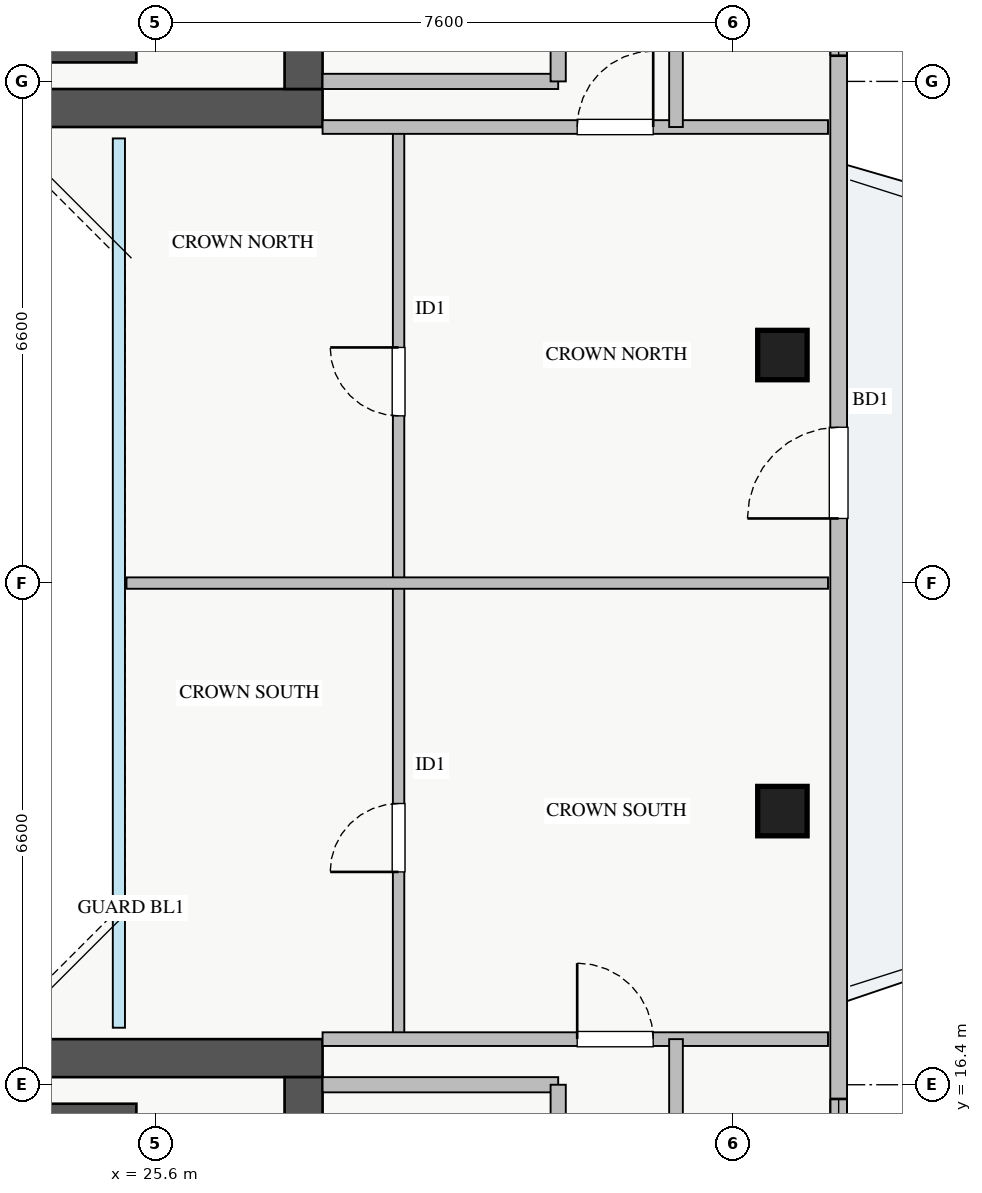
"""IFC4 building model, lengths in metres.
Left out: names, types, materials, properties, quantities, classifications, styles, units other than length and angle.
Written with IfcOpenShell. Run it as: python <this file> out.ifc"""

import sys

from ifc_helpers import new_model, si_unit, direction, frame, frame_2d, origin, origin_2d, place, context, subcontext, project, spatial, rectangle, extrude, source, transform, mapped, element, fill, save


model = new_model("IFC4")
c1 = context("Model", 3, precision=1e-05, world=origin(), true_north=direction((0.0, 1.0)))
c2 = subcontext(c1, "Body", "Model", "MODEL_VIEW")
j1 = project(units=[si_unit("LENGTHUNIT", "METRE"), si_unit("PLANEANGLEUNIT", "RADIAN")], contexts=[c1])
p1 = place(None, origin())
s1 = spatial("IfcSite", under=j1, at=p1, CompositionType="ELEMENT")
p2 = place(p1, origin())
s2 = spatial("IfcBuilding", under=s1, at=p2, CompositionType="ELEMENT")
p3 = place(p2, frame((0.0, 0.0, 243.75)))
s3 = spatial("IfcBuildingStorey", under=s2, at=p3, CompositionType="ELEMENT", Elevation=243.75)
for number, where, z_axis, x_axis in (
    (1, (18.2, 29.95, 0.0), (0.0, 0.0, 1.0), (1.0, 0.0, 0.0)),
    (2, (18.2, 16.05, 0.0), (0.0, 0.0, 1.0), (1.0, 0.0, 0.0)),
):
    element("IfcWall", number, at=place(p3, frame(where, z_axis=z_axis, x_axis=x_axis)), inside=s3, PredefinedType="SHEAR", context=c2, shape_type="SweptSolid", body=[
        extrude(rectangle(XDim=7.15, YDim=0.2, at=frame_2d((3.575, 0.0))), origin(), (0.0, 0.0, 1.0), 3.25),
    ])
p4 = place(p3, frame((10.2, 29.25, 0.0), z_axis=(0.0, 0.0, 1.0), x_axis=(1.0, 0.0, 0.0)))
e3 = element("IfcWall", 3, at=p4, inside=s3, PredefinedType="SHEAR", context=c2, shape_type="SweptSolid", body=[
    extrude(rectangle(XDim=17.6, YDim=0.5, at=frame_2d((8.8, 0.0))), origin(), (0.0, 0.0, 1.0), 3.25),
])
p5 = place(p3, frame((27.55, 29.5, 0.0), z_axis=(0.0, 0.0, 1.0), x_axis=(0.0, 1.0, 0.0)))
e4 = element("IfcWall", 4, at=p5, inside=s3, PredefinedType="SHEAR", context=c2, shape_type="SweptSolid", body=[
    extrude(rectangle(XDim=6.2, YDim=0.5, at=frame_2d((3.1, 0.0))), origin(), (0.0, 0.0, 1.0), 3.25),
])
p6 = place(p5, frame((1.1, 0.0, 0.0)))
e5 = element("IfcOpeningElement", 5, at=p6, cuts=e4, PredefinedType="OPENING", context=c2, shape_type="SweptSolid", body=[
    extrude(rectangle(XDim=1.3, YDim=2.05, at=frame_2d((0.65, 1.025))), frame((0.0, 0.26, 0.0), z_axis=(0.0, -1.0, 0.0), x_axis=(1.0, 0.0, 0.0)), (0.0, 0.0, 1.0), 0.52),
])
p7 = place(p3, frame((10.2, 16.75, 0.0), z_axis=(0.0, 0.0, 1.0), x_axis=(1.0, 0.0, 0.0)))
e6 = element("IfcWall", 6, at=p7, inside=s3, PredefinedType="SHEAR", context=c2, shape_type="SweptSolid", body=[
    extrude(rectangle(XDim=17.6, YDim=0.5, at=frame_2d((8.8, 0.0))), origin(), (0.0, 0.0, 1.0), 3.25),
])
p8 = place(p3, frame((27.55, 10.3, 0.0), z_axis=(0.0, 0.0, 1.0), x_axis=(0.0, 1.0, 0.0)))
e7 = element("IfcWall", 7, at=p8, inside=s3, PredefinedType="SHEAR", context=c2, shape_type="SweptSolid", body=[
    extrude(rectangle(XDim=6.2, YDim=0.5, at=frame_2d((3.1, 0.0))), origin(), (0.0, 0.0, 1.0), 3.25),
])
p9 = place(p8, frame((2.1, 0.0, 0.0)))
e8 = element("IfcOpeningElement", 8, at=p9, cuts=e7, PredefinedType="OPENING", context=c2, shape_type="SweptSolid", body=[
    extrude(rectangle(XDim=1.3, YDim=2.05, at=frame_2d((0.65, 1.025))), frame((0.0, 0.26, 0.0), z_axis=(0.0, -1.0, 0.0), x_axis=(1.0, 0.0, 0.0)), (0.0, 0.0, 1.0), 0.52),
])
m1 = source(origin(), c2, "Body", "SweptSolid", [
    extrude(rectangle(XDim=0.65, YDim=0.65, at=origin_2d()), origin(), (0.0, 0.0, 1.0), 3.25),
])
for number, where, z_axis, x_axis in (
    (9, (33.85, 20.0, 0.0), (0.0, 0.0, 1.0), (1.0, 0.0, 0.0)),
    (10, (33.85, 26.0, 0.0), (0.0, 0.0, 1.0), (1.0, 0.0, 0.0)),
):
    element("IfcColumn", number, at=place(p3, frame(where, z_axis=z_axis, x_axis=x_axis)), inside=s3, PredefinedType="COLUMN", context=c2, shape_type="MappedRepresentation", body=[
        mapped(m1, transform((0.0, 0.0, 0.0), x_axis=(1.0, 0.0, 0.0), y_axis=(0.0, 1.0, 0.0), z_axis=(0.0, 0.0, 1.0), scale=1.0)),
    ])
p10 = place(p3, frame((34.59, 12.35, 0.0), z_axis=(0.0, 0.0, 1.0), x_axis=(0.0, 1.0, 0.0)))
e11 = element("IfcWall", 11, at=p10, inside=s3, PredefinedType="STANDARD", context=c2, shape_type="SweptSolid", body=[
    extrude(rectangle(XDim=21.3, YDim=0.22, at=frame_2d((10.65, 0.0))), origin(), (0.0, 0.0, 1.0), 2.61),
])
p11 = place(p10, frame((11.5, 0.0, 0.0)))
e12 = element("IfcOpeningElement", 12, at=p11, cuts=e11, PredefinedType="OPENING", context=c2, shape_type="SweptSolid", body=[
    extrude(rectangle(XDim=1.2, YDim=2.1, at=frame_2d((0.6, 1.05))), frame((0.0, 0.12, 0.0), z_axis=(0.0, -1.0, 0.0), x_axis=(1.0, 0.0, 0.0)), (0.0, 0.0, 1.0), 0.24),
])
p12 = place(p10, frame((1.463, 0.0, 0.9)))
e13 = element("IfcOpeningElement", 13, at=p12, cuts=e11, PredefinedType="OPENING", context=c2, shape_type="SweptSolid", body=[
    extrude(rectangle(XDim=2.4, YDim=1.48, at=frame_2d((1.2, 0.74))), frame((0.0, 0.12, 0.0), z_axis=(0.0, -1.0, 0.0), x_axis=(1.0, 0.0, 0.0)), (0.0, 0.0, 1.0), 0.24),
])
p13 = place(p10, frame((17.588, 0.0, 0.9)))
e14 = element("IfcOpeningElement", 14, at=p13, cuts=e11, PredefinedType="OPENING", context=c2, shape_type="SweptSolid", body=[
    extrude(rectangle(XDim=2.1, YDim=1.48, at=frame_2d((1.05, 0.74))), frame((0.0, 0.12, 0.0), z_axis=(0.0, -1.0, 0.0), x_axis=(1.0, 0.0, 0.0)), (0.0, 0.0, 1.0), 0.24),
])
p14 = place(p3, frame((27.8, 29.6, 0.0), z_axis=(0.0, 0.0, 1.0), x_axis=(1.0, 0.0, 0.0)))
e15 = element("IfcWall", 15, at=p14, inside=s3, PredefinedType="PARTITIONING", context=c2, shape_type="SweptSolid", body=[
    extrude(rectangle(XDim=3.1, YDim=0.2, at=frame_2d((1.55, 0.0))), origin(), (0.0, 0.0, 1.0), 3.07),
])
p15 = place(p3, frame((30.9, 29.6, 0.0), z_axis=(0.0, 0.0, 1.0), x_axis=(0.0, 1.0, 0.0)))
e16 = element("IfcWall", 16, at=p15, inside=s3, PredefinedType="PARTITIONING", context=c2, shape_type="SweptSolid", body=[
    extrude(rectangle(XDim=3.9, YDim=0.2, at=frame_2d((1.95, 0.0))), origin(), (0.0, 0.0, 1.0), 2.865),
])
p16 = place(p15, frame((1.4, 0.0, 0.0)))
e17 = element("IfcOpeningElement", 17, at=p16, cuts=e16, PredefinedType="OPENING", context=c2, shape_type="SweptSolid", body=[
    extrude(rectangle(XDim=1.1, YDim=2.05, at=frame_2d((0.55, 1.025))), frame((0.0, 0.11, 0.0), z_axis=(0.0, -1.0, 0.0), x_axis=(1.0, 0.0, 0.0)), (0.0, 0.0, 1.0), 0.22),
])
p17 = place(p3, frame((27.8, 16.4, 0.0), z_axis=(0.0, 0.0, 1.0), x_axis=(1.0, 0.0, 0.0)))
e18 = element("IfcWall", 18, at=p17, inside=s3, PredefinedType="PARTITIONING", context=c2, shape_type="SweptSolid", body=[
    extrude(rectangle(XDim=3.1, YDim=0.2, at=frame_2d((1.55, 0.0))), origin(), (0.0, 0.0, 1.0), 3.07),
])
p18 = place(p3, frame((30.9, 12.5, 0.0), z_axis=(0.0, 0.0, 1.0), x_axis=(0.0, 1.0, 0.0)))
e19 = element("IfcWall", 19, at=p18, inside=s3, PredefinedType="PARTITIONING", context=c2, shape_type="SweptSolid", body=[
    extrude(rectangle(XDim=3.9, YDim=0.2, at=frame_2d((1.95, 0.0))), origin(), (0.0, 0.0, 1.0), 2.865),
])
p19 = place(p18, frame((1.4, 0.0, 0.0)))
e20 = element("IfcOpeningElement", 20, at=p19, cuts=e19, PredefinedType="OPENING", context=c2, shape_type="SweptSolid", body=[
    extrude(rectangle(XDim=1.1, YDim=2.05, at=frame_2d((0.55, 1.025))), frame((0.0, 0.11, 0.0), z_axis=(0.0, -1.0, 0.0), x_axis=(1.0, 0.0, 0.0)), (0.0, 0.0, 1.0), 0.22),
])
p20 = place(p3, frame((28.8, 17.0, 0.0), z_axis=(0.0, 0.0, 1.0), x_axis=(0.0, 1.0, 0.0)))
e21 = element("IfcWall", 21, at=p20, inside=s3, PredefinedType="PARTITIONING", context=c2, shape_type="SweptSolid", body=[
    extrude(rectangle(XDim=6.0, YDim=0.15, at=frame_2d((3.0, 0.0))), origin(), (0.0, 0.0, 1.0), 3.07),
])
p21 = place(p20, frame((2.2, 0.0, 0.0)))
e22 = element("IfcOpeningElement", 22, at=p21, cuts=e21, PredefinedType="OPENING", context=c2, shape_type="SweptSolid", body=[
    extrude(rectangle(XDim=0.9, YDim=2.05, at=frame_2d((0.45, 1.025))), frame((0.0, 0.085, 0.0), z_axis=(0.0, -1.0, 0.0), x_axis=(1.0, 0.0, 0.0)), (0.0, 0.0, 1.0), 0.17),
])
p22 = place(p3, frame((28.8, 23.0, 0.0), z_axis=(0.0, 0.0, 1.0), x_axis=(0.0, 1.0, 0.0)))
e23 = element("IfcWall", 23, at=p22, inside=s3, PredefinedType="PARTITIONING", context=c2, shape_type="SweptSolid", body=[
    extrude(rectangle(XDim=6.0, YDim=0.15, at=frame_2d((3.0, 0.0))), origin(), (0.0, 0.0, 1.0), 3.07),
])
p23 = place(p22, frame((2.2, 0.0, 0.0)))
e24 = element("IfcOpeningElement", 24, at=p23, cuts=e23, PredefinedType="OPENING", context=c2, shape_type="SweptSolid", body=[
    extrude(rectangle(XDim=0.9, YDim=2.05, at=frame_2d((0.45, 1.025))), frame((0.0, 0.085, 0.0), z_axis=(0.0, -1.0, 0.0), x_axis=(1.0, 0.0, 0.0)), (0.0, 0.0, 1.0), 0.17),
])
p24 = place(p3, frame((25.22, 23.0, 0.0), z_axis=(0.0, 0.0, 1.0), x_axis=(1.0, 0.0, 0.0)))
e25 = element("IfcWall", 25, at=p24, inside=s3, PredefinedType="PARTITIONING", context=c2, shape_type="SweptSolid", body=[
    extrude(rectangle(XDim=9.23, YDim=0.15, at=frame_2d((4.615, 0.0))), origin(), (0.0, 0.0, 1.0), 3.07),
])
p25 = place(p3, frame((27.8, 17.0, 0.0), z_axis=(0.0, 0.0, 1.0), x_axis=(1.0, 0.0, 0.0)))
e26 = element("IfcWall", 26, at=p25, inside=s3, PredefinedType="PARTITIONING", context=c2, shape_type="SweptSolid", body=[
    extrude(rectangle(XDim=6.65, YDim=0.18, at=frame_2d((3.325, 0.0))), origin(), (0.0, 0.0, 1.0), 3.07),
])
p26 = place(p25, frame((3.35, 0.0, 0.0)))
e27 = element("IfcOpeningElement", 27, at=p26, cuts=e26, PredefinedType="OPENING", context=c2, shape_type="SweptSolid", body=[
    extrude(rectangle(XDim=1.0, YDim=2.05, at=frame_2d((0.5, 1.025))), frame((0.0, 0.1, 0.0), z_axis=(0.0, -1.0, 0.0), x_axis=(1.0, 0.0, 0.0)), (0.0, 0.0, 1.0), 0.2),
])
p27 = place(p3, frame((27.8, 29.0, 0.0), z_axis=(0.0, 0.0, 1.0), x_axis=(1.0, 0.0, 0.0)))
e28 = element("IfcWall", 28, at=p27, inside=s3, PredefinedType="PARTITIONING", context=c2, shape_type="SweptSolid", body=[
    extrude(rectangle(XDim=6.65, YDim=0.18, at=frame_2d((3.325, 0.0))), origin(), (0.0, 0.0, 1.0), 3.07),
])
p28 = place(p27, frame((3.35, 0.0, 0.0)))
e29 = element("IfcOpeningElement", 29, at=p28, cuts=e28, PredefinedType="OPENING", context=c2, shape_type="SweptSolid", body=[
    extrude(rectangle(XDim=1.0, YDim=2.05, at=frame_2d((0.5, 1.025))), frame((0.0, 0.1, 0.0), z_axis=(0.0, -1.0, 0.0), x_axis=(1.0, 0.0, 0.0)), (0.0, 0.0, 1.0), 0.2),
])
p29 = place(p3, frame((32.45, 29.0, 0.0), z_axis=(0.0, 0.0, 1.0), x_axis=(0.0, 1.0, 0.0)))
e30 = element("IfcWall", 30, at=p29, inside=s3, PredefinedType="PARTITIONING", context=c2, shape_type="SweptSolid", body=[
    extrude(rectangle(XDim=5.18, YDim=0.18, at=frame_2d((2.59, 0.0))), origin(), (0.0, 0.0, 1.0), 3.07),
])
p30 = place(p29, frame((1.25, 0.0, 0.0)))
e31 = element("IfcOpeningElement", 31, at=p30, cuts=e30, PredefinedType="OPENING", context=c2, shape_type="SweptSolid", body=[
    extrude(rectangle(XDim=0.9, YDim=2.05, at=frame_2d((0.45, 1.025))), frame((0.0, 0.1, 0.0), z_axis=(0.0, -1.0, 0.0), x_axis=(1.0, 0.0, 0.0)), (0.0, 0.0, 1.0), 0.2),
])
p31 = place(p3, frame((32.45, 11.82, 0.0), z_axis=(0.0, 0.0, 1.0), x_axis=(0.0, 1.0, 0.0)))
e32 = element("IfcWall", 32, at=p31, inside=s3, PredefinedType="PARTITIONING", context=c2, shape_type="SweptSolid", body=[
    extrude(rectangle(XDim=5.18, YDim=0.18, at=frame_2d((2.59, 0.0))), origin(), (0.0, 0.0, 1.0), 3.07),
])
p32 = place(p31, frame((1.25, 0.0, 0.0)))
e33 = element("IfcOpeningElement", 33, at=p32, cuts=e32, PredefinedType="OPENING", context=c2, shape_type="SweptSolid", body=[
    extrude(rectangle(XDim=0.9, YDim=2.05, at=frame_2d((0.45, 1.025))), frame((0.0, 0.1, 0.0), z_axis=(0.0, -1.0, 0.0), x_axis=(1.0, 0.0, 0.0)), (0.0, 0.0, 1.0), 0.2),
])
m2 = source(origin(), c2, "Body", "SweptSolid", [
    extrude(rectangle(XDim=1.2, YDim=2.1, at=frame_2d((0.6, 1.05))), frame((0.0, 0.025, 0.0), z_axis=(0.0, -1.0, 0.0), x_axis=(1.0, 0.0, 0.0)), (0.0, 0.0, 1.0), 0.05),
])
p33 = place(p11, origin())
e34 = element("IfcDoor", 34, at=p33, inside=s3, OperationType="SINGLE_SWING_LEFT", PredefinedType="DOOR", context=c2, shape_type="MappedRepresentation", body=[
    mapped(m2, transform((0.0, 0.0, 0.0), x_axis=(1.0, 0.0, 0.0), y_axis=(0.0, 1.0, 0.0), z_axis=(0.0, 0.0, 1.0), scale=1.0)),
])
fill(e12, e34)
m3 = source(origin(), c2, "Body", "SweptSolid", [
    extrude(rectangle(XDim=2.4, YDim=1.48, at=frame_2d((1.2, 0.74))), frame((0.0, 0.03, 0.0), z_axis=(0.0, -1.0, 0.0), x_axis=(1.0, 0.0, 0.0)), (0.0, 0.0, 1.0), 0.06),
])
p34 = place(p12, origin())
e35 = element("IfcWindow", 35, at=p34, inside=s3, PartitioningType="TRIPLE_PANEL_VERTICAL", PredefinedType="WINDOW", context=c2, shape_type="MappedRepresentation", body=[
    mapped(m3, transform((0.0, 0.0, 0.0), x_axis=(1.0, 0.0, 0.0), y_axis=(0.0, 1.0, 0.0), z_axis=(0.0, 0.0, 1.0), scale=1.0)),
])
fill(e13, e35)
m4 = source(origin(), c2, "Body", "SweptSolid", [
    extrude(rectangle(XDim=2.1, YDim=1.48, at=frame_2d((1.05, 0.74))), frame((0.0, 0.03, 0.0), z_axis=(0.0, -1.0, 0.0), x_axis=(1.0, 0.0, 0.0)), (0.0, 0.0, 1.0), 0.06),
])
p35 = place(p13, origin())
e36 = element("IfcWindow", 36, at=p35, inside=s3, PartitioningType="TRIPLE_PANEL_VERTICAL", PredefinedType="WINDOW", context=c2, shape_type="MappedRepresentation", body=[
    mapped(m4, transform((0.0, 0.0, 0.0), x_axis=(1.0, 0.0, 0.0), y_axis=(0.0, 1.0, 0.0), z_axis=(0.0, 0.0, 1.0), scale=1.0)),
])
fill(e14, e36)
m5 = source(origin(), c2, "Body", "SweptSolid", [
    extrude(rectangle(XDim=0.9, YDim=2.05, at=frame_2d((0.45, 1.025))), frame((0.0, 0.025, 0.0), z_axis=(0.0, -1.0, 0.0), x_axis=(1.0, 0.0, 0.0)), (0.0, 0.0, 1.0), 0.05),
])
p36 = place(p21, origin())
e37 = element("IfcDoor", 37, at=p36, inside=s3, OperationType="SINGLE_SWING_LEFT", PredefinedType="DOOR", context=c2, shape_type="MappedRepresentation", body=[
    mapped(m5, transform((0.0, 0.0, 0.0), x_axis=(1.0, 0.0, 0.0), y_axis=(0.0, 1.0, 0.0), z_axis=(0.0, 0.0, 1.0), scale=1.0)),
])
fill(e22, e37)
p37 = place(p23, origin())
e38 = element("IfcDoor", 38, at=p37, inside=s3, OperationType="SINGLE_SWING_RIGHT", PredefinedType="DOOR", context=c2, shape_type="MappedRepresentation", body=[
    mapped(m5, transform((0.0, 0.0, 0.0), x_axis=(1.0, 0.0, 0.0), y_axis=(0.0, 1.0, 0.0), z_axis=(0.0, 0.0, 1.0), scale=1.0)),
])
fill(e24, e38)
m6 = source(origin(), c2, "Body", "SweptSolid", [
    extrude(rectangle(XDim=1.0, YDim=2.05, at=frame_2d((0.5, 1.025))), frame((0.0, 0.025, 0.0), z_axis=(0.0, -1.0, 0.0), x_axis=(1.0, 0.0, 0.0)), (0.0, 0.0, 1.0), 0.05),
])
p38 = place(p26, origin())
e39 = element("IfcDoor", 39, at=p38, inside=s3, OperationType="SINGLE_SWING_LEFT", PredefinedType="DOOR", context=c2, shape_type="MappedRepresentation", body=[
    mapped(m6, transform((0.0, 0.0, 0.0), x_axis=(1.0, 0.0, 0.0), y_axis=(0.0, 1.0, 0.0), z_axis=(0.0, 0.0, 1.0), scale=1.0)),
])
fill(e27, e39)
p39 = place(p28, origin())
e40 = element("IfcDoor", 40, at=p39, inside=s3, OperationType="SINGLE_SWING_RIGHT", PredefinedType="DOOR", context=c2, shape_type="MappedRepresentation", body=[
    mapped(m6, transform((0.0, 0.0, 0.0), x_axis=(1.0, 0.0, 0.0), y_axis=(0.0, 1.0, 0.0), z_axis=(0.0, 0.0, 1.0), scale=1.0)),
])
fill(e29, e40)
save(model, sys.argv[1])
